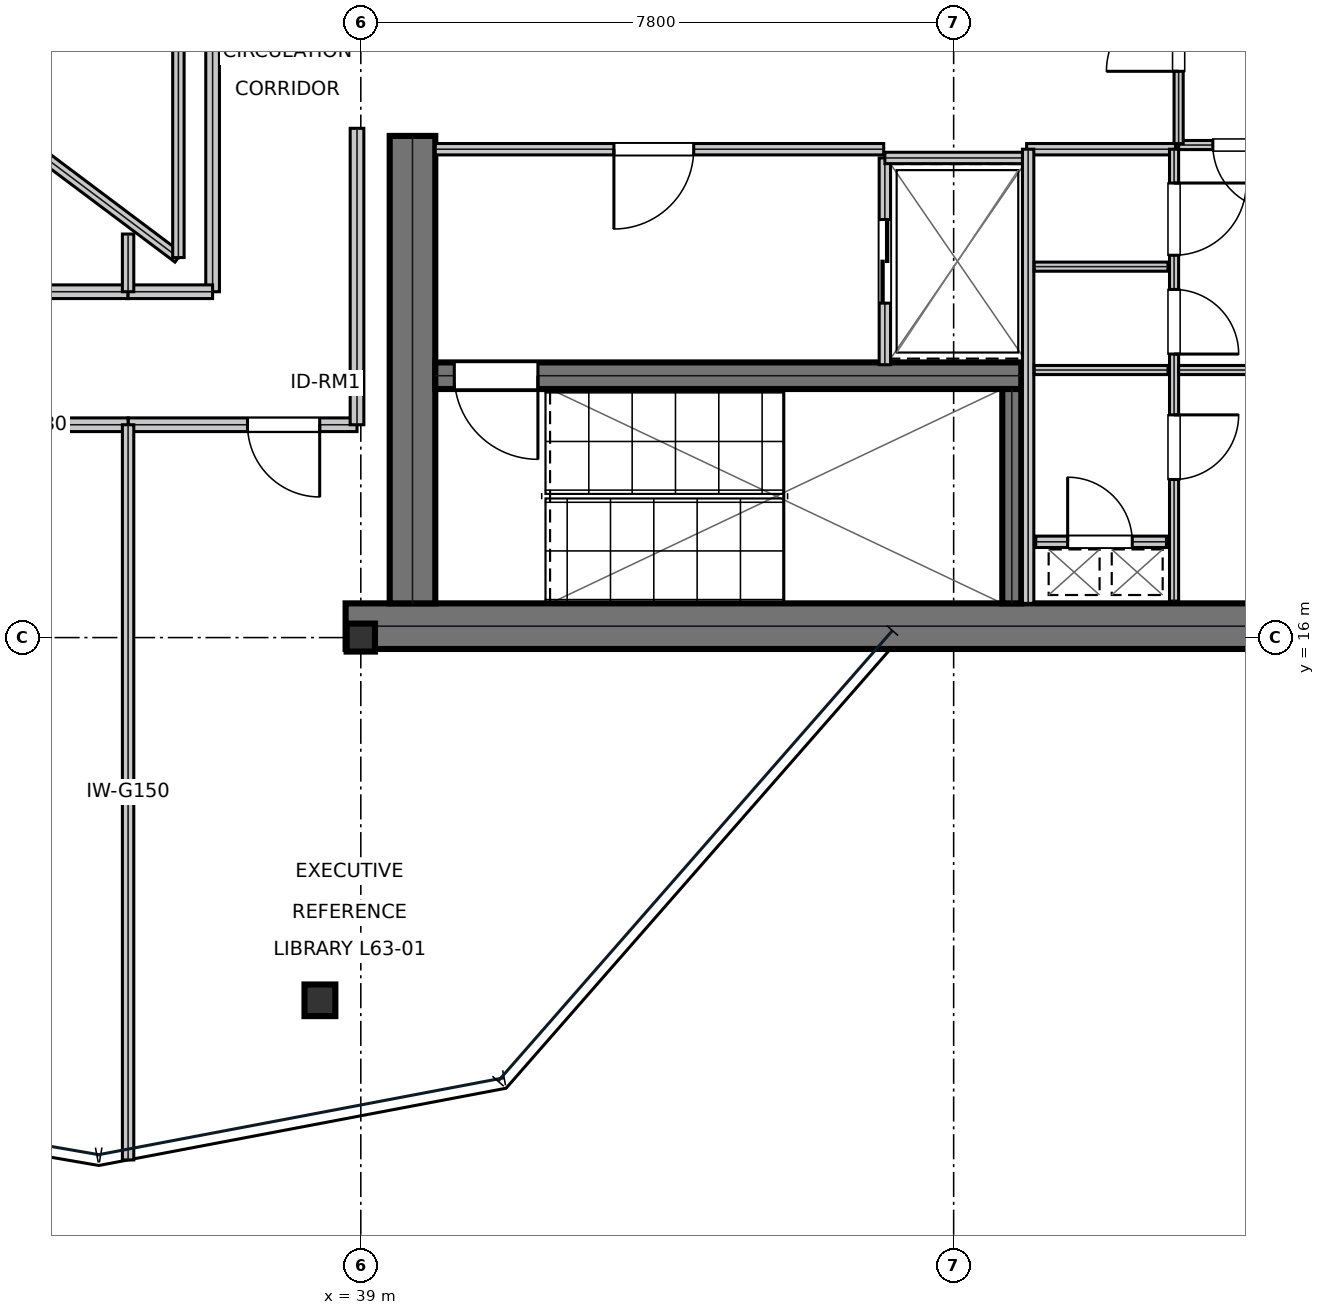
"""IFC4 building model, lengths in metres.
Left out: names, types, materials, properties, quantities, classifications, styles, units other than length and angle.
Written with IfcOpenShell. Run it as: python <this file> out.ifc"""

import sys

from ifc_helpers import new_model, si_unit, direction, frame, frame_2d, origin, origin_2d, place, context, subcontext, project, spatial, rectangle, i_section, extrude, element, fill, save


model = new_model("IFC4")
c1 = context("Model", 3, precision=1e-05, world=origin(), true_north=direction((0.0, 1.0)))
c2 = subcontext(c1, "Body", "Model", "MODEL_VIEW")
j1 = project(units=[si_unit("LENGTHUNIT", "METRE"), si_unit("PLANEANGLEUNIT", "RADIAN")], contexts=[c1])
p1 = place(None, origin())
s1 = spatial("IfcSite", under=j1, at=p1, CompositionType="ELEMENT")
p2 = place(p1, origin())
s2 = spatial("IfcBuilding", under=s1, at=p2, CompositionType="ELEMENT")
p3 = place(p2, frame((0.0, 0.0, 270.9)))
s3 = spatial("IfcBuildingStorey", under=s2, at=p3, CompositionType="ELEMENT", Elevation=270.9)
p4 = place(p3, frame((38.8, 16.15, 0.0), z_axis=(0.0, 0.0, 1.0), x_axis=(1.0, 0.0, 0.0)))
e1 = element("IfcWall", 1, at=p4, inside=s3, PredefinedType="SHEAR", context=c2, shape_type="SweptSolid", body=[
    extrude(rectangle(XDim=16.0, YDim=0.6, at=frame_2d((8.0, 0.0))), origin(), (0.0, 0.0, 1.0), 3.81),
])
p5 = place(p3, frame((39.68, 16.45, 0.0), z_axis=(0.0, 0.0, 1.0), x_axis=(0.0, 1.0, 0.0)))
e2 = element("IfcWall", 2, at=p5, inside=s3, PredefinedType="SHEAR", context=c2, shape_type="SweptSolid", body=[
    extrude(rectangle(XDim=6.15, YDim=0.6, at=frame_2d((3.075, 0.0))), origin(), (0.0, 0.0, 1.0), 3.81),
])
p6 = place(p3, frame((39.98, 19.445, 0.0), z_axis=(0.0, 0.0, 1.0), x_axis=(1.0, 0.0, 0.0)))
e3 = element("IfcWall", 3, at=p6, inside=s3, PredefinedType="SHEAR", context=c2, shape_type="SweptSolid", body=[
    extrude(rectangle(XDim=7.71, YDim=0.35, at=frame_2d((3.855, 0.0))), origin(), (0.0, 0.0, 1.0), 3.81),
])
p7 = place(p6, frame((0.25, 0.0, 0.0)))
e4 = element("IfcOpeningElement", 4, at=p7, cuts=e3, PredefinedType="OPENING", context=c2, shape_type="SweptSolid", body=[
    extrude(rectangle(XDim=1.1, YDim=2.15, at=frame_2d((0.55, 1.075))), frame((0.0, 0.185, 0.0), z_axis=(0.0, -1.0, 0.0), x_axis=(1.0, 0.0, 0.0)), (0.0, 0.0, 1.0), 0.37),
])
p8 = place(p3, frame((47.565, 16.45, 0.0), z_axis=(0.0, 0.0, 1.0), x_axis=(0.0, 1.0, 0.0)))
e5 = element("IfcWall", 5, at=p8, inside=s3, PredefinedType="SHEAR", context=c2, shape_type="SweptSolid", body=[
    extrude(rectangle(XDim=2.82, YDim=0.25, at=frame_2d((1.41, 0.0))), origin(), (0.0, 0.0, 1.0), 3.81),
])
p9 = place(p3, frame((39.0, 16.0, 0.0), z_axis=(0.0, 0.0, 1.0), x_axis=(1.0, 0.0, 0.0)))
e6 = element("IfcColumn", 6, at=p9, inside=s3, PredefinedType="COLUMN", context=c2, shape_type="SweptSolid", body=[
    extrude(i_section(OverallWidth=0.373, OverallDepth=0.368, WebThickness=0.015, FlangeThickness=0.024, at=origin_2d()), origin(), (0.0, 0.0, 1.0), 4.044),
])
p10 = place(p3, frame((38.462, 11.228, 0.016), z_axis=(0.0, 0.0, 1.0), x_axis=(1.0, 0.0, 0.0)))
e7 = element("IfcColumn", 7, at=p10, inside=s3, PredefinedType="COLUMN", context=c2, shape_type="SweptSolid", body=[
    extrude(i_section(OverallWidth=0.406, OverallDepth=0.416, WebThickness=0.03, FlangeThickness=0.048, at=origin_2d()), origin(), (0.0, 0.0, 1.0), 4.018),
])
p11 = place(p3, frame((39.98, 22.425, 0.0), z_axis=(0.0, 0.0, 1.0), x_axis=(1.0, 0.0, 0.0)))
e8 = element("IfcWall", 8, at=p11, inside=s3, PredefinedType="PARTITIONING", context=c2, shape_type="SweptSolid", body=[
    extrude(rectangle(XDim=5.9, YDim=0.15, at=frame_2d((2.95, 0.0))), origin(), (0.0, 0.0, 1.0), 3.81),
])
p12 = place(p11, frame((2.35, 0.0, 0.0)))
e9 = element("IfcOpeningElement", 9, at=p12, cuts=e8, PredefinedType="OPENING", context=c2, shape_type="SweptSolid", body=[
    extrude(rectangle(XDim=1.05, YDim=2.15, at=frame_2d((0.525, 1.075))), frame((0.0, 0.085, 0.0), z_axis=(0.0, -1.0, 0.0), x_axis=(1.0, 0.0, 0.0)), (0.0, 0.0, 1.0), 0.17),
])
p13 = place(p3, frame((45.895, 19.59, 0.0), z_axis=(0.0, 0.0, 1.0), x_axis=(0.0, 1.0, 0.0)))
e10 = element("IfcWall", 10, at=p13, inside=s3, PredefinedType="PARTITIONING", context=c2, shape_type="SweptSolid", body=[
    extrude(rectangle(XDim=2.72, YDim=0.15, at=frame_2d((1.36, 0.0))), origin(), (0.0, 0.0, 1.0), 3.81),
])
p14 = place(p13, frame((0.81, 0.0, 0.0)))
e11 = element("IfcOpeningElement", 11, at=p14, cuts=e10, PredefinedType="OPENING", context=c2, shape_type="SweptSolid", body=[
    extrude(rectangle(XDim=1.1, YDim=2.15, at=frame_2d((0.55, 1.075))), frame((0.0, 0.085, 0.0), z_axis=(0.0, -1.0, 0.0), x_axis=(1.0, 0.0, 0.0)), (0.0, 0.0, 1.0), 0.17),
])
p15 = place(p3, frame((45.895, 22.31, 0.0), z_axis=(0.0, 0.0, 1.0), x_axis=(1.0, 0.0, 0.0)))
e12 = element("IfcWall", 12, at=p15, inside=s3, PredefinedType="PARTITIONING", context=c2, shape_type="SweptSolid", body=[
    extrude(rectangle(XDim=1.915, YDim=0.15, at=frame_2d((0.958, 0.0))), origin(), (0.0, 0.0, 1.0), 3.81),
])
p16 = place(p3, frame((47.88, 17.26, 0.0), z_axis=(0.0, 0.0, 1.0), x_axis=(1.0, 0.0, 0.0)))
e13 = element("IfcWall", 13, at=p16, inside=s3, PredefinedType="PARTITIONING", context=c2, shape_type="SweptSolid", body=[
    extrude(rectangle(XDim=1.72, YDim=0.15, at=frame_2d((0.86, 0.0))), origin(), (0.0, 0.0, 1.0), 3.81),
])
p17 = place(p16, frame((0.42, 0.0, 0.0)))
e14 = element("IfcOpeningElement", 14, at=p17, cuts=e13, PredefinedType="OPENING", context=c2, shape_type="SweptSolid", body=[
    extrude(rectangle(XDim=0.85, YDim=2.15, at=frame_2d((0.425, 1.075))), frame((0.0, 0.085, 0.0), z_axis=(0.0, -1.0, 0.0), x_axis=(1.0, 0.0, 0.0)), (0.0, 0.0, 1.0), 0.17),
])
p18 = place(p3, frame((47.76, 22.425, 0.0), z_axis=(0.0, 0.0, 1.0), x_axis=(1.0, 0.0, 0.0)))
e15 = element("IfcWall", 15, at=p18, inside=s3, PredefinedType="PARTITIONING", context=c2, shape_type="SweptSolid", body=[
    extrude(rectangle(XDim=1.96, YDim=0.15, at=frame_2d((0.98, 0.0))), origin(), (0.0, 0.0, 1.0), 3.81),
])
p19 = place(p3, frame((47.78, 16.45, 0.0), z_axis=(0.0, 0.0, 1.0), x_axis=(0.0, 1.0, 0.0)))
e16 = element("IfcWall", 16, at=p19, inside=s3, PredefinedType="PARTITIONING", context=c2, shape_type="SweptSolid", body=[
    extrude(rectangle(XDim=5.975, YDim=0.15, at=frame_2d((2.988, 0.0))), origin(), (0.0, 0.0, 1.0), 3.81),
])
for number, where, z_axis, x_axis in (
    (17, (47.86, 19.52, 0.0), (0.0, 0.0, 1.0), (1.0, 0.0, 0.0)),
    (18, (47.86, 20.88, 0.0), (0.0, 0.0, 1.0), (1.0, 0.0, 0.0)),
):
    element("IfcWall", number, at=place(p3, frame(where, z_axis=z_axis, x_axis=x_axis)), inside=s3, PredefinedType="PARTITIONING", context=c2, shape_type="SweptSolid", body=[
        extrude(rectangle(XDim=1.76, YDim=0.12, at=frame_2d((0.88, 0.0))), origin(), (0.0, 0.0, 1.0), 3.81),
    ])
p20 = place(p3, frame((49.7, 16.48, 0.0), z_axis=(0.0, 0.0, 1.0), x_axis=(0.0, 1.0, 0.0)))
e19 = element("IfcWall", 19, at=p20, inside=s3, PredefinedType="PARTITIONING", context=c2, shape_type="SweptSolid", body=[
    extrude(rectangle(XDim=5.945, YDim=0.12, at=frame_2d((2.973, 0.0))), origin(), (0.0, 0.0, 1.0), 3.81),
])
p21 = place(p20, frame((1.6, 0.0, 0.0)))
e20 = element("IfcOpeningElement", 20, at=p21, cuts=e19, PredefinedType="OPENING", context=c2, shape_type="SweptSolid", body=[
    extrude(rectangle(XDim=0.85, YDim=2.15, at=frame_2d((0.425, 1.075))), frame((0.0, 0.07, 0.0), z_axis=(0.0, -1.0, 0.0), x_axis=(1.0, 0.0, 0.0)), (0.0, 0.0, 1.0), 0.14),
])
p22 = place(p20, frame((3.25, 0.0, 0.0)))
e21 = element("IfcOpeningElement", 21, at=p22, cuts=e19, PredefinedType="OPENING", context=c2, shape_type="SweptSolid", body=[
    extrude(rectangle(XDim=0.85, YDim=2.15, at=frame_2d((0.425, 1.075))), frame((0.0, 0.07, 0.0), z_axis=(0.0, -1.0, 0.0), x_axis=(1.0, 0.0, 0.0)), (0.0, 0.0, 1.0), 0.14),
])
p23 = place(p20, frame((4.55, 0.0, 0.0)))
e22 = element("IfcOpeningElement", 22, at=p23, cuts=e19, PredefinedType="OPENING", context=c2, shape_type="SweptSolid", body=[
    extrude(rectangle(XDim=0.95, YDim=2.15, at=frame_2d((0.475, 1.075))), frame((0.0, 0.07, 0.0), z_axis=(0.0, -1.0, 0.0), x_axis=(1.0, 0.0, 0.0)), (0.0, 0.0, 1.0), 0.14),
])
p24 = place(p3, frame((49.76, 22.48, 0.0), z_axis=(0.0, 0.0, 1.0), x_axis=(1.0, 0.0, 0.0)))
e23 = element("IfcWall", 23, at=p24, inside=s3, PredefinedType="PARTITIONING", context=c2, shape_type="SweptSolid", body=[
    extrude(rectangle(XDim=3.9, YDim=0.12, at=frame_2d((1.95, 0.0))), origin(), (0.0, 0.0, 1.0), 3.81),
])
p25 = place(p24, frame((0.45, 0.0, 0.0)))
e24 = element("IfcOpeningElement", 24, at=p25, cuts=e23, PredefinedType="OPENING", context=c2, shape_type="SweptSolid", body=[
    extrude(rectangle(XDim=0.85, YDim=2.15, at=frame_2d((0.425, 1.075))), frame((0.0, 0.07, 0.0), z_axis=(0.0, -1.0, 0.0), x_axis=(1.0, 0.0, 0.0)), (0.0, 0.0, 1.0), 0.14),
])
p26 = place(p3, frame((49.76, 19.52, 0.0), z_axis=(0.0, 0.0, 1.0), x_axis=(1.0, 0.0, 0.0)))
e25 = element("IfcWall", 25, at=p26, inside=s3, PredefinedType="PARTITIONING", context=c2, shape_type="SweptSolid", body=[
    extrude(rectangle(XDim=1.64, YDim=0.12, at=frame_2d((0.82, 0.0))), origin(), (0.0, 0.0, 1.0), 3.81),
])
p27 = place(p3, frame((49.76, 22.5, 0.0), z_axis=(0.0, 0.0, 1.0), x_axis=(0.0, 1.0, 0.0)))
e26 = element("IfcWall", 26, at=p27, inside=s3, PredefinedType="PARTITIONING", context=c2, shape_type="SweptSolid", body=[
    extrude(rectangle(XDim=5.72, YDim=0.12, at=frame_2d((2.86, 0.0))), origin(), (0.0, 0.0, 1.0), 3.81),
])
p28 = place(p27, frame((0.95, 0.0, 0.0)))
e27 = element("IfcOpeningElement", 27, at=p28, cuts=e26, PredefinedType="OPENING", context=c2, shape_type="SweptSolid", body=[
    extrude(rectangle(XDim=0.95, YDim=2.15, at=frame_2d((0.475, 1.075))), frame((0.0, 0.07, 0.0), z_axis=(0.0, -1.0, 0.0), x_axis=(1.0, 0.0, 0.0)), (0.0, 0.0, 1.0), 0.14),
])
p29 = place(p3, frame((35.938, 18.8, 0.0), z_axis=(0.0, 0.0, 1.0), x_axis=(1.0, 0.0, 0.0)))
e28 = element("IfcWall", 28, at=p29, inside=s3, PredefinedType="SOLIDWALL", context=c2, shape_type="SweptSolid", body=[
    extrude(rectangle(XDim=3.012, YDim=0.18, at=frame_2d((1.506, 0.0))), origin(), (0.0, 0.0, 1.0), 3.81),
])
p30 = place(p29, frame((1.571, 0.0, 0.0)))
e29 = element("IfcOpeningElement", 29, at=p30, cuts=e28, PredefinedType="OPENING", context=c2, shape_type="SweptSolid", body=[
    extrude(rectangle(XDim=0.95, YDim=2.15, at=frame_2d((0.475, 1.075))), frame((0.0, 0.1, 0.0), z_axis=(0.0, -1.0, 0.0), x_axis=(1.0, 0.0, 0.0)), (0.0, 0.0, 1.0), 0.2),
])
p31 = place(p3, frame((27.122, 18.8, 0.0), z_axis=(0.0, 0.0, 1.0), x_axis=(1.0, 0.0, 0.0)))
e30 = element("IfcWall", 30, at=p31, inside=s3, PredefinedType="SOLIDWALL", context=c2, shape_type="SweptSolid", body=[
    extrude(rectangle(XDim=8.816, YDim=0.18, at=frame_2d((4.408, 0.0))), origin(), (0.0, 0.0, 1.0), 3.27),
])
p32 = place(p31, frame((3.958, 0.0, 0.0)))
e31 = element("IfcOpeningElement", 31, at=p32, cuts=e30, PredefinedType="OPENING", context=c2, shape_type="SweptSolid", body=[
    extrude(rectangle(XDim=0.9, YDim=2.15, at=frame_2d((0.45, 1.075))), frame((0.0, 0.1, 0.0), z_axis=(0.0, -1.0, 0.0), x_axis=(1.0, 0.0, 0.0)), (0.0, 0.0, 1.0), 0.2),
])
p33 = place(p3, frame((25.895, 20.55, 0.0), z_axis=(0.0, 0.0, 1.0), x_axis=(1.0, 0.0, 0.0)))
e32 = element("IfcWall", 32, at=p33, inside=s3, PredefinedType="SOLIDWALL", context=c2, shape_type="SweptSolid", body=[
    extrude(rectangle(XDim=10.043, YDim=0.18, at=frame_2d((5.021, 0.0))), origin(), (0.0, 0.0, 1.0), 3.27),
])
p34 = place(p33, frame((4.572, 0.0, 0.0)))
e33 = element("IfcOpeningElement", 33, at=p34, cuts=e32, PredefinedType="OPENING", context=c2, shape_type="SweptSolid", body=[
    extrude(rectangle(XDim=0.9, YDim=2.15, at=frame_2d((0.45, 1.075))), frame((0.0, 0.1, 0.0), z_axis=(0.0, -1.0, 0.0), x_axis=(1.0, 0.0, 0.0)), (0.0, 0.0, 1.0), 0.2),
])
p35 = place(p3, frame((38.95, 18.8, 0.0), z_axis=(0.0, 0.0, 1.0), x_axis=(0.0, 1.0, 0.0)))
e34 = element("IfcWall", 34, at=p35, inside=s3, PredefinedType="SOLIDWALL", context=c2, shape_type="SweptSolid", body=[
    extrude(rectangle(XDim=3.9, YDim=0.18, at=frame_2d((1.95, 0.0))), origin(), (0.0, 0.0, 1.0), 3.54),
])
p36 = place(p3, frame((37.05, 20.55, 0.0), z_axis=(0.0, 0.0, 1.0), x_axis=(0.0, 1.0, 0.0)))
e35 = element("IfcWall", 35, at=p36, inside=s3, PredefinedType="SOLIDWALL", context=c2, shape_type="SweptSolid", body=[
    extrude(rectangle(XDim=8.25, YDim=0.18, at=frame_2d((4.125, 0.0))), origin(), (0.0, 0.0, 1.0), 3.54),
])
p37 = place(p3, frame((35.938, 20.55, 0.0), z_axis=(0.0, 0.0, 1.0), x_axis=(1.0, 0.0, 0.0)))
e36 = element("IfcWall", 36, at=p37, inside=s3, PredefinedType="SOLIDWALL", context=c2, shape_type="SweptSolid", body=[
    extrude(rectangle(XDim=1.112, YDim=0.18, at=frame_2d((0.556, 0.0))), origin(), (0.0, 0.0, 1.0), 3.54),
])
p38 = place(p3, frame((35.938, 9.128, 0.0), z_axis=(0.0, 0.0, 1.0), x_axis=(0.0, 1.0, 0.0)))
e37 = element("IfcWall", 37, at=p38, inside=s3, PredefinedType="MOVABLE", context=c2, shape_type="SweptSolid", body=[
    extrude(rectangle(XDim=9.672, YDim=0.15, at=frame_2d((4.836, 0.0))), origin(), (0.0, 0.0, 1.0), 3.27),
])
p39 = place(p3, frame((35.938, 20.55, 0.0), z_axis=(0.0, 0.0, 1.0), x_axis=(0.0, 1.0, 0.0)))
e38 = element("IfcWall", 38, at=p39, inside=s3, PredefinedType="MOVABLE", context=c2, shape_type="SweptSolid", body=[
    extrude(rectangle(XDim=0.759, YDim=0.15, at=frame_2d((0.379, 0.0))), origin(), (0.0, 0.0, 1.0), 3.81),
])
p40 = place(p3, frame((32.6, 24.0, 0.0), z_axis=(0.0, 0.0, 1.0), x_axis=(0.8, -0.6, 0.0)))
e39 = element("IfcWall", 39, at=p40, inside=s3, PredefinedType="MOVABLE", context=c2, shape_type="SweptSolid", body=[
    extrude(rectangle(XDim=5.0, YDim=0.15, at=frame_2d((2.5, 0.0))), origin(), (0.0, 0.0, 1.0), 3.81),
])
p41 = place(p3, frame((36.6, 21.0, 0.0), z_axis=(0.0, 0.0, 1.0), x_axis=(0.0, 1.0, 0.0)))
e40 = element("IfcWall", 40, at=p41, inside=s3, PredefinedType="MOVABLE", context=c2, shape_type="SweptSolid", body=[
    extrude(rectangle(XDim=6.0, YDim=0.15, at=frame_2d((3.0, 0.0))), origin(), (0.0, 0.0, 1.0), 3.81),
])
p42 = place(p12, frame((1.05, 0.0, 0.0), z_axis=(0.0, 0.0, 1.0), x_axis=(-1.0, 0.0, 0.0)))
e41 = element("IfcDoor", 41, at=p42, inside=s3, OperationType="SINGLE_SWING_RIGHT", PredefinedType="DOOR", context=c2, shape_type="SweptSolid", body=[
    extrude(rectangle(XDim=1.05, YDim=2.15, at=frame_2d((0.525, 1.075))), frame((0.0, 0.025, 0.0), z_axis=(0.0, -1.0, 0.0), x_axis=(1.0, 0.0, 0.0)), (0.0, 0.0, 1.0), 0.05),
])
fill(e9, e41)
p43 = place(p14, frame((1.1, 0.0, 0.0), z_axis=(0.0, 0.0, 1.0), x_axis=(-1.0, 0.0, 0.0)))
e42 = element("IfcDoor", 42, at=p43, inside=s3, OperationType="DOUBLE_DOOR_SLIDING", PredefinedType="DOOR", context=c2, shape_type="SweptSolid", body=[
    extrude(rectangle(XDim=1.1, YDim=2.15, at=frame_2d((0.55, 1.075))), frame((0.0, 0.025, 0.0), z_axis=(0.0, -1.0, 0.0), x_axis=(1.0, 0.0, 0.0)), (0.0, 0.0, 1.0), 0.05),
])
fill(e11, e42)
p44 = place(p17, origin())
e43 = element("IfcDoor", 43, at=p44, inside=s3, OperationType="SINGLE_SWING_LEFT", PredefinedType="TRAPDOOR", context=c2, shape_type="SweptSolid", body=[
    extrude(rectangle(XDim=0.85, YDim=2.15, at=frame_2d((0.425, 1.075))), frame((0.0, 0.025, 0.0), z_axis=(0.0, -1.0, 0.0), x_axis=(1.0, 0.0, 0.0)), (0.0, 0.0, 1.0), 0.05),
])
fill(e14, e43)
p45 = place(p21, frame((0.85, 0.0, 0.0), z_axis=(0.0, 0.0, 1.0), x_axis=(-1.0, 0.0, 0.0)))
e44 = element("IfcDoor", 44, at=p45, inside=s3, OperationType="SINGLE_SWING_LEFT", PredefinedType="DOOR", context=c2, shape_type="SweptSolid", body=[
    extrude(rectangle(XDim=0.85, YDim=2.15, at=frame_2d((0.425, 1.075))), frame((0.0, 0.025, 0.0), z_axis=(0.0, -1.0, 0.0), x_axis=(1.0, 0.0, 0.0)), (0.0, 0.0, 1.0), 0.05),
])
fill(e20, e44)
p46 = place(p22, frame((0.85, 0.0, 0.0), z_axis=(0.0, 0.0, 1.0), x_axis=(-1.0, 0.0, 0.0)))
e45 = element("IfcDoor", 45, at=p46, inside=s3, OperationType="SINGLE_SWING_RIGHT", PredefinedType="DOOR", context=c2, shape_type="SweptSolid", body=[
    extrude(rectangle(XDim=0.85, YDim=2.15, at=frame_2d((0.425, 1.075))), frame((0.0, 0.025, 0.0), z_axis=(0.0, -1.0, 0.0), x_axis=(1.0, 0.0, 0.0)), (0.0, 0.0, 1.0), 0.05),
])
fill(e21, e45)
p47 = place(p23, frame((0.95, 0.0, 0.0), z_axis=(0.0, 0.0, 1.0), x_axis=(-1.0, 0.0, 0.0)))
e46 = element("IfcDoor", 46, at=p47, inside=s3, OperationType="SINGLE_SWING_LEFT", PredefinedType="DOOR", context=c2, shape_type="SweptSolid", body=[
    extrude(rectangle(XDim=0.95, YDim=2.15, at=frame_2d((0.475, 1.075))), frame((0.0, 0.025, 0.0), z_axis=(0.0, -1.0, 0.0), x_axis=(1.0, 0.0, 0.0)), (0.0, 0.0, 1.0), 0.05),
])
fill(e22, e46)
p48 = place(p25, frame((0.85, 0.0, 0.0), z_axis=(0.0, 0.0, 1.0), x_axis=(-1.0, 0.0, 0.0)))
e47 = element("IfcDoor", 47, at=p48, inside=s3, OperationType="SINGLE_SWING_LEFT", PredefinedType="DOOR", context=c2, shape_type="SweptSolid", body=[
    extrude(rectangle(XDim=0.85, YDim=2.15, at=frame_2d((0.425, 1.075))), frame((0.0, 0.025, 0.0), z_axis=(0.0, -1.0, 0.0), x_axis=(1.0, 0.0, 0.0)), (0.0, 0.0, 1.0), 0.05),
])
fill(e24, e47)
p49 = place(p28, origin())
e48 = element("IfcDoor", 48, at=p49, inside=s3, OperationType="SINGLE_SWING_LEFT", PredefinedType="DOOR", context=c2, shape_type="SweptSolid", body=[
    extrude(rectangle(XDim=0.95, YDim=2.15, at=frame_2d((0.475, 1.075))), frame((0.0, 0.025, 0.0), z_axis=(0.0, -1.0, 0.0), x_axis=(1.0, 0.0, 0.0)), (0.0, 0.0, 1.0), 0.05),
])
fill(e27, e48)
p50 = place(p30, frame((0.95, 0.0, 0.0), z_axis=(0.0, 0.0, 1.0), x_axis=(-1.0, 0.0, 0.0)))
e49 = element("IfcDoor", 49, at=p50, inside=s3, OperationType="SINGLE_SWING_LEFT", PredefinedType="DOOR", context=c2, shape_type="SweptSolid", body=[
    extrude(rectangle(XDim=0.95, YDim=2.15, at=frame_2d((0.475, 1.075))), frame((0.0, 0.025, 0.0), z_axis=(0.0, -1.0, 0.0), x_axis=(1.0, 0.0, 0.0)), (0.0, 0.0, 1.0), 0.05),
])
fill(e29, e49)
p51 = place(p7, frame((1.1, 0.0, 0.0), z_axis=(0.0, 0.0, 1.0), x_axis=(-1.0, 0.0, 0.0)))
e50 = element("IfcDoor", 50, at=p51, inside=s3, OperationType="SINGLE_SWING_LEFT", PredefinedType="DOOR", context=c2, shape_type="SweptSolid", body=[
    extrude(rectangle(XDim=1.1, YDim=2.15, at=frame_2d((0.55, 1.075))), frame((0.0, 0.025, 0.0), z_axis=(0.0, -1.0, 0.0), x_axis=(1.0, 0.0, 0.0)), (0.0, 0.0, 1.0), 0.05),
])
fill(e4, e50)
save(model, sys.argv[1])
